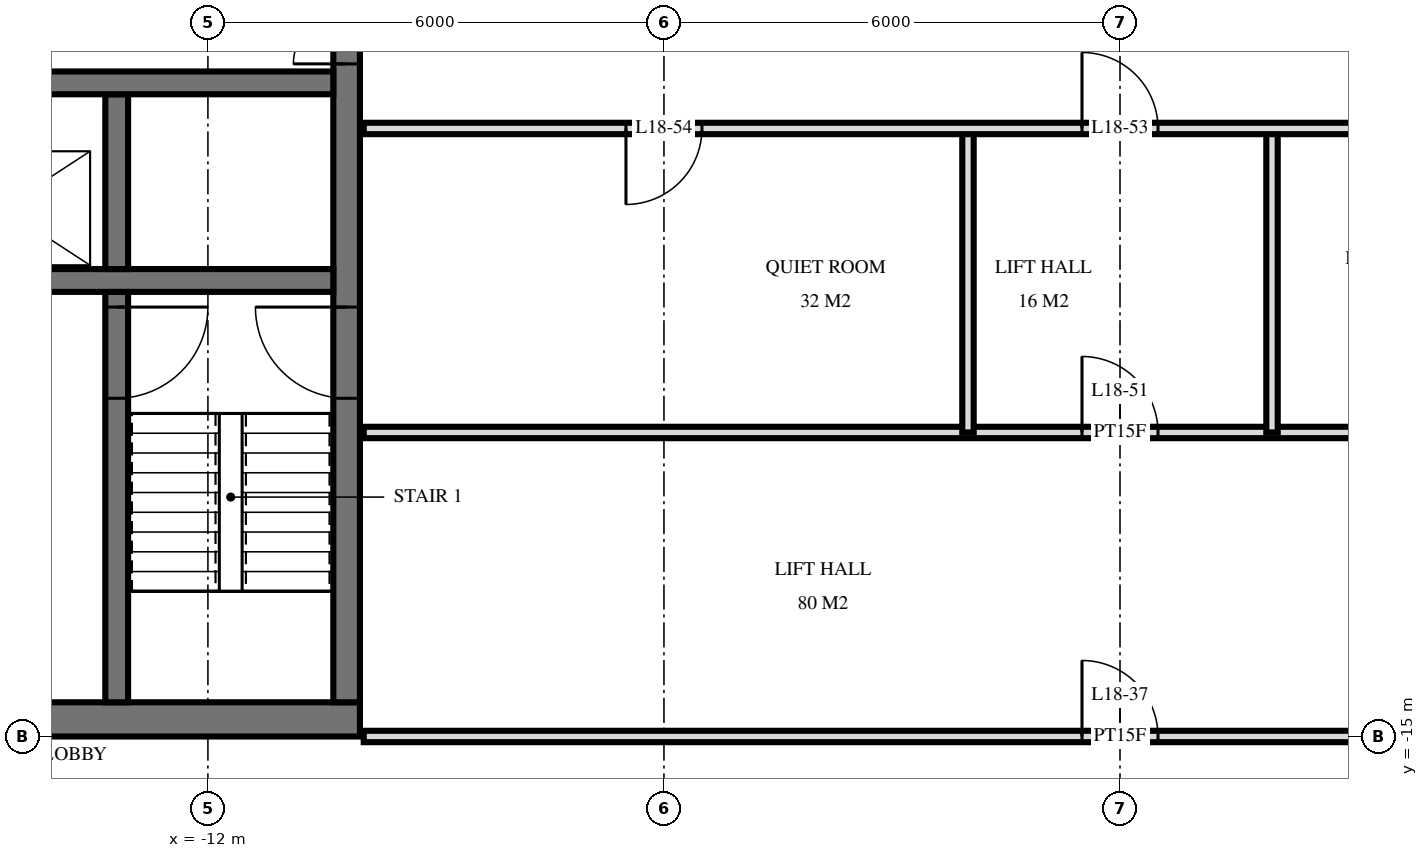
"""IFC4 building model, lengths in metres.
Left out: names, types, materials, properties, quantities, classifications, styles, units other than length and angle.
Written with IfcOpenShell. Run it as: python <this file> out.ifc"""

import sys

from ifc_helpers import new_model, si_unit, direction, frame, frame_2d, origin, place, context, subcontext, project, spatial, rectangle, extrude, element, fill, save


model = new_model("IFC4")
c1 = context("Model", 3, precision=1e-05, world=origin(), true_north=direction((0.0, 1.0)))
c2 = subcontext(c1, "Body", "Model", "MODEL_VIEW")
j1 = project(units=[si_unit("LENGTHUNIT", "METRE"), si_unit("PLANEANGLEUNIT", "RADIAN")], contexts=[c1])
p1 = place(None, origin())
s1 = spatial("IfcSite", under=j1, at=p1, CompositionType="ELEMENT")
p2 = place(p1, origin())
s2 = spatial("IfcBuilding", under=s1, at=p2, CompositionType="ELEMENT")
p3 = place(p2, frame((0.0, 0.0, 74.4)))
s3 = spatial("IfcBuildingStorey", under=s2, at=p3, CompositionType="ELEMENT", Elevation=74.4)
p4 = place(p3, frame((-29.5, -14.775, 0.0), z_axis=(0.0, 0.0, 1.0), x_axis=(1.0, 0.0, 0.0)))
e1 = element("IfcWall", 1, at=p4, inside=s3, PredefinedType="SHEAR", context=c2, shape_type="SweptSolid", body=[
    extrude(rectangle(XDim=19.5, YDim=0.45, at=frame_2d((9.75, 0.0))), origin(), (0.0, 0.0, 1.0), 3.6),
])
p5 = place(p4, frame((11.2, 0.0, 0.0)))
e2 = element("IfcOpeningElement", 2, at=p5, cuts=e1, PredefinedType="OPENING", context=c2, shape_type="SweptSolid", body=[
    extrude(rectangle(XDim=1.2, YDim=2.1, at=frame_2d((0.6, 1.05))), frame((0.0, 0.235, 0.0), z_axis=(0.0, -1.0, 0.0), x_axis=(1.0, 0.0, 0.0)), (0.0, 0.0, 1.0), 0.47),
])
p6 = place(p4, frame((14.25, 0.0, 0.0)))
e3 = element("IfcOpeningElement", 3, at=p6, cuts=e1, PredefinedType="OPENING", context=c2, shape_type="SweptSolid", body=[
    extrude(rectangle(XDim=1.1, YDim=2.1, at=frame_2d((0.55, 1.05))), frame((0.0, 0.235, 0.0), z_axis=(0.0, -1.0, 0.0), x_axis=(1.0, 0.0, 0.0)), (0.0, 0.0, 1.0), 0.47),
])
p7 = place(p4, frame((8.5, 0.0, 0.0)))
e4 = element("IfcOpeningElement", 4, at=p7, cuts=e1, PredefinedType="OPENING", context=c2, shape_type="SweptSolid", body=[
    extrude(rectangle(XDim=0.9, YDim=2.1, at=frame_2d((0.45, 1.05))), frame((0.0, 0.235, 0.0), z_axis=(0.0, -1.0, 0.0), x_axis=(1.0, 0.0, 0.0)), (0.0, 0.0, 1.0), 0.47),
])
p8 = place(p4, frame((6.05, 0.0, 0.0)))
e5 = element("IfcOpeningElement", 5, at=p8, cuts=e1, PredefinedType="OPENING", context=c2, shape_type="SweptSolid", body=[
    extrude(rectangle(XDim=1.0, YDim=2.1, at=frame_2d((0.5, 1.05))), frame((0.0, 0.235, 0.0), z_axis=(0.0, -1.0, 0.0), x_axis=(1.0, 0.0, 0.0)), (0.0, 0.0, 1.0), 0.47),
])
p9 = place(p4, frame((2.988, 0.0, 0.0)))
e6 = element("IfcOpeningElement", 6, at=p9, cuts=e1, PredefinedType="OPENING", context=c2, shape_type="SweptSolid", body=[
    extrude(rectangle(XDim=1.0, YDim=2.1, at=frame_2d((0.5, 1.05))), frame((0.0, 0.235, 0.0), z_axis=(0.0, -1.0, 0.0), x_axis=(1.0, 0.0, 0.0)), (0.0, 0.0, 1.0), 0.47),
])
p10 = place(p4, frame((0.663, 0.0, 0.0)))
e7 = element("IfcOpeningElement", 7, at=p10, cuts=e1, PredefinedType="OPENING", context=c2, shape_type="SweptSolid", body=[
    extrude(rectangle(XDim=1.0, YDim=2.1, at=frame_2d((0.5, 1.05))), frame((0.0, 0.235, 0.0), z_axis=(0.0, -1.0, 0.0), x_axis=(1.0, 0.0, 0.0)), (0.0, 0.0, 1.0), 0.47),
])
p11 = place(p3, frame((-10.175, -14.55, 0.0), z_axis=(0.0, 0.0, 1.0), x_axis=(0.0, 1.0, 0.0)))
e8 = element("IfcWall", 8, at=p11, inside=s3, PredefinedType="SHEAR", context=c2, shape_type="SweptSolid", body=[
    extrude(rectangle(XDim=14.1, YDim=0.35, at=frame_2d((7.05, 0.0))), origin(), (0.0, 0.0, 1.0), 3.6),
])
p12 = place(p11, frame((8.4, 0.0, 0.0)))
e9 = element("IfcOpeningElement", 9, at=p12, cuts=e8, PredefinedType="OPENING", context=c2, shape_type="SweptSolid", body=[
    extrude(rectangle(XDim=1.4, YDim=2.4, at=frame_2d((0.7, 1.2))), frame((0.0, 0.185, 0.0), z_axis=(0.0, -1.0, 0.0), x_axis=(1.0, 0.0, 0.0)), (0.0, 0.0, 1.0), 0.37),
])
p13 = place(p11, frame((10.0, 0.0, 0.0)))
e10 = element("IfcOpeningElement", 10, at=p13, cuts=e8, PredefinedType="OPENING", context=c2, shape_type="SweptSolid", body=[
    extrude(rectangle(XDim=1.4, YDim=2.4, at=frame_2d((0.7, 1.2))), frame((0.0, 0.185, 0.0), z_axis=(0.0, -1.0, 0.0), x_axis=(1.0, 0.0, 0.0)), (0.0, 0.0, 1.0), 0.37),
])
p14 = place(p11, frame((4.0, 0.0, 0.0)))
e11 = element("IfcOpeningElement", 11, at=p14, cuts=e8, PredefinedType="OPENING", context=c2, shape_type="SweptSolid", body=[
    extrude(rectangle(XDim=1.2, YDim=2.1, at=frame_2d((0.6, 1.05))), frame((0.0, 0.185, 0.0), z_axis=(0.0, -1.0, 0.0), x_axis=(1.0, 0.0, 0.0)), (0.0, 0.0, 1.0), 0.37),
])
p15 = place(p3, frame((-29.05, -6.4, 0.0), z_axis=(0.0, 0.0, 1.0), x_axis=(1.0, 0.0, 0.0)))
e12 = element("IfcWall", 12, at=p15, inside=s3, PredefinedType="SHEAR", context=c2, shape_type="SweptSolid", body=[
    extrude(rectangle(XDim=18.7, YDim=0.3, at=frame_2d((9.35, 0.0))), origin(), (0.0, 0.0, 1.0), 3.6),
])
p16 = place(p15, frame((2.95, 0.0, 0.0)))
e13 = element("IfcOpeningElement", 13, at=p16, cuts=e12, PredefinedType="OPENING", context=c2, shape_type="SweptSolid", body=[
    extrude(rectangle(XDim=1.1, YDim=2.1, at=frame_2d((0.55, 1.05))), frame((0.0, 0.16, 0.0), z_axis=(0.0, -1.0, 0.0), x_axis=(1.0, 0.0, 0.0)), (0.0, 0.0, 1.0), 0.32),
])
p17 = place(p15, frame((0.55, 0.0, 0.0)))
e14 = element("IfcOpeningElement", 14, at=p17, cuts=e12, PredefinedType="OPENING", context=c2, shape_type="SweptSolid", body=[
    extrude(rectangle(XDim=1.1, YDim=2.1, at=frame_2d((0.55, 1.05))), frame((0.0, 0.16, 0.0), z_axis=(0.0, -1.0, 0.0), x_axis=(1.0, 0.0, 0.0)), (0.0, 0.0, 1.0), 0.32),
])
p18 = place(p15, frame((10.8, 0.0, 0.0)))
e15 = element("IfcOpeningElement", 15, at=p18, cuts=e12, PredefinedType="OPENING", context=c2, shape_type="SweptSolid", body=[
    extrude(rectangle(XDim=1.1, YDim=2.1, at=frame_2d((0.55, 1.05))), frame((0.0, 0.16, 0.0), z_axis=(0.0, -1.0, 0.0), x_axis=(1.0, 0.0, 0.0)), (0.0, 0.0, 1.0), 0.32),
])
p19 = place(p15, frame((5.6, 0.0, 0.0)))
e16 = element("IfcOpeningElement", 16, at=p19, cuts=e12, PredefinedType="OPENING", context=c2, shape_type="SweptSolid", body=[
    extrude(rectangle(XDim=1.0, YDim=2.1, at=frame_2d((0.5, 1.05))), frame((0.0, 0.16, 0.0), z_axis=(0.0, -1.0, 0.0), x_axis=(1.0, 0.0, 0.0)), (0.0, 0.0, 1.0), 0.32),
])
p20 = place(p3, frame((-29.05, -9.0, 0.0), z_axis=(0.0, 0.0, 1.0), x_axis=(1.0, 0.0, 0.0)))
e17 = element("IfcWall", 17, at=p20, inside=s3, PredefinedType="SHEAR", context=c2, shape_type="SweptSolid", body=[
    extrude(rectangle(XDim=18.7, YDim=0.3, at=frame_2d((9.35, 0.0))), origin(), (0.0, 0.0, 1.0), 3.6),
])
p21 = place(p20, frame((13.8, 0.0, 0.0)))
e18 = element("IfcOpeningElement", 18, at=p21, cuts=e17, PredefinedType="OPENING", context=c2, shape_type="SweptSolid", body=[
    extrude(rectangle(XDim=1.1, YDim=2.1, at=frame_2d((0.55, 1.05))), frame((0.0, 0.16, 0.0), z_axis=(0.0, -1.0, 0.0), x_axis=(1.0, 0.0, 0.0)), (0.0, 0.0, 1.0), 0.32),
])
p22 = place(p3, frame((-13.2, -8.85, 0.0), z_axis=(0.0, 0.0, 1.0), x_axis=(0.0, 1.0, 0.0)))
e19 = element("IfcWall", 19, at=p22, inside=s3, PredefinedType="SHEAR", context=c2, shape_type="SweptSolid", body=[
    extrude(rectangle(XDim=2.3, YDim=0.3, at=frame_2d((1.15, 0.0))), origin(), (0.0, 0.0, 1.0), 3.6),
])
p23 = place(p3, frame((-13.2, -14.55, 0.0), z_axis=(0.0, 0.0, 1.0), x_axis=(0.0, 1.0, 0.0)))
e20 = element("IfcWall", 20, at=p23, inside=s3, PredefinedType="SHEAR", context=c2, shape_type="SweptSolid", body=[
    extrude(rectangle(XDim=5.4, YDim=0.3, at=frame_2d((2.7, 0.0))), origin(), (0.0, 0.0, 1.0), 3.6),
])
p24 = place(p23, frame((4.0, 0.0, 0.0)))
e21 = element("IfcOpeningElement", 21, at=p24, cuts=e20, PredefinedType="OPENING", context=c2, shape_type="SweptSolid", body=[
    extrude(rectangle(XDim=1.2, YDim=2.1, at=frame_2d((0.6, 1.05))), frame((0.0, 0.16, 0.0), z_axis=(0.0, -1.0, 0.0), x_axis=(1.0, 0.0, 0.0)), (0.0, 0.0, 1.0), 0.32),
])
for number, where, z_axis, x_axis in (
    (22, (2.0, -11.0, 0.0), (0.0, 0.0, 1.0), (0.0, 1.0, 0.0)),
    (23, (-2.0, -11.0, 0.0), (0.0, 0.0, 1.0), (0.0, 1.0, 0.0)),
):
    element("IfcWall", number, at=place(p3, frame(where, z_axis=z_axis, x_axis=x_axis)), inside=s3, PredefinedType="PARTITIONING", context=c2, shape_type="SweptSolid", body=[
        extrude(rectangle(XDim=4.0, YDim=0.15, at=frame_2d((2.0, 0.0))), origin(), (0.0, 0.0, 1.0), 3.32),
    ])
p25 = place(p3, frame((-9.95, -15.0, 0.0), z_axis=(0.0, 0.0, 1.0), x_axis=(1.0, 0.0, 0.0)))
e24 = element("IfcWall", 24, at=p25, inside=s3, PredefinedType="PARTITIONING", context=c2, shape_type="SweptSolid", body=[
    extrude(rectangle(XDim=19.9, YDim=0.15, at=frame_2d((9.95, 0.0))), origin(), (0.0, 0.0, 1.0), 2.684),
])
p26 = place(p25, frame((9.45, 0.0, 0.0)))
e25 = element("IfcOpeningElement", 25, at=p26, cuts=e24, PredefinedType="OPENING", context=c2, shape_type="SweptSolid", body=[
    extrude(rectangle(XDim=1.0, YDim=2.1, at=frame_2d((0.5, 1.05))), frame((0.0, 0.085, 0.0), z_axis=(0.0, -1.0, 0.0), x_axis=(1.0, 0.0, 0.0)), (0.0, 0.0, 1.0), 0.17),
])
p27 = place(p3, frame((-9.95, -11.0, 0.0), z_axis=(0.0, 0.0, 1.0), x_axis=(1.0, 0.0, 0.0)))
e26 = element("IfcWall", 26, at=p27, inside=s3, PredefinedType="PARTITIONING", context=c2, shape_type="SweptSolid", body=[
    extrude(rectangle(XDim=19.9, YDim=0.15, at=frame_2d((9.95, 0.0))), origin(), (0.0, 0.0, 1.0), 3.32),
])
p28 = place(p27, frame((9.45, 0.0, 0.0)))
e27 = element("IfcOpeningElement", 27, at=p28, cuts=e26, PredefinedType="OPENING", context=c2, shape_type="SweptSolid", body=[
    extrude(rectangle(XDim=1.0, YDim=2.1, at=frame_2d((0.5, 1.05))), frame((0.0, 0.085, 0.0), z_axis=(0.0, -1.0, 0.0), x_axis=(1.0, 0.0, 0.0)), (0.0, 0.0, 1.0), 0.17),
])
p29 = place(p27, frame((15.45, 0.0, 0.0)))
e28 = element("IfcOpeningElement", 28, at=p29, cuts=e26, PredefinedType="OPENING", context=c2, shape_type="SweptSolid", body=[
    extrude(rectangle(XDim=1.0, YDim=2.1, at=frame_2d((0.5, 1.05))), frame((0.0, 0.085, 0.0), z_axis=(0.0, -1.0, 0.0), x_axis=(1.0, 0.0, 0.0)), (0.0, 0.0, 1.0), 0.17),
])
p30 = place(p3, frame((-9.95, -7.0, 0.0), z_axis=(0.0, 0.0, 1.0), x_axis=(1.0, 0.0, 0.0)))
e29 = element("IfcWall", 29, at=p30, inside=s3, PredefinedType="PARTITIONING", context=c2, shape_type="SweptSolid", body=[
    extrude(rectangle(XDim=19.9, YDim=0.15, at=frame_2d((9.95, 0.0))), origin(), (0.0, 0.0, 1.0), 3.32),
])
p31 = place(p30, frame((9.45, 0.0, 0.0)))
e30 = element("IfcOpeningElement", 30, at=p31, cuts=e29, PredefinedType="OPENING", context=c2, shape_type="SweptSolid", body=[
    extrude(rectangle(XDim=1.0, YDim=2.1, at=frame_2d((0.5, 1.05))), frame((0.0, 0.085, 0.0), z_axis=(0.0, -1.0, 0.0), x_axis=(1.0, 0.0, 0.0)), (0.0, 0.0, 1.0), 0.17),
])
p32 = place(p30, frame((3.45, 0.0, 0.0)))
e31 = element("IfcOpeningElement", 31, at=p32, cuts=e29, PredefinedType="OPENING", context=c2, shape_type="SweptSolid", body=[
    extrude(rectangle(XDim=1.0, YDim=2.1, at=frame_2d((0.5, 1.05))), frame((0.0, 0.085, 0.0), z_axis=(0.0, -1.0, 0.0), x_axis=(1.0, 0.0, 0.0)), (0.0, 0.0, 1.0), 0.17),
])
p33 = place(p12, origin())
e32 = element("IfcDoor", 32, at=p33, inside=s3, OperationType="DOUBLE_DOOR_SINGLE_SWING", PredefinedType="DOOR", context=c2, shape_type="SweptSolid", body=[
    extrude(rectangle(XDim=1.4, YDim=2.4, at=frame_2d((0.7, 1.2))), frame((0.0, 0.025, 0.0), z_axis=(0.0, -1.0, 0.0), x_axis=(1.0, 0.0, 0.0)), (0.0, 0.0, 1.0), 0.05),
])
fill(e9, e32)
p34 = place(p14, origin())
e33 = element("IfcDoor", 33, at=p34, inside=s3, OperationType="SINGLE_SWING_LEFT", PredefinedType="DOOR", context=c2, shape_type="SweptSolid", body=[
    extrude(rectangle(XDim=1.2, YDim=2.1, at=frame_2d((0.6, 1.05))), frame((0.0, 0.025, 0.0), z_axis=(0.0, -1.0, 0.0), x_axis=(1.0, 0.0, 0.0)), (0.0, 0.0, 1.0), 0.05),
])
fill(e11, e33)
p35 = place(p24, frame((0.6, 0.0, 0.0), z_axis=(0.0, 0.0, 1.0), x_axis=(-1.0, 0.0, 0.0)))
e34 = element("IfcDoor", 34, at=p35, inside=s3, OperationType="SINGLE_SWING_RIGHT", PredefinedType="DOOR", context=c2, shape_type="SweptSolid", body=[
    extrude(rectangle(XDim=1.2, YDim=2.1, at=frame_2d((0.0, 1.05))), frame((0.0, -0.025, 0.0), z_axis=(0.0, 1.0, 0.0), x_axis=(-1.0, 0.0, 0.0)), (0.0, 0.0, 1.0), 0.05),
])
fill(e21, e34)
p36 = place(p26, origin())
e35 = element("IfcDoor", 35, at=p36, inside=s3, OperationType="SINGLE_SWING_RIGHT", PredefinedType="DOOR", context=c2, shape_type="SweptSolid", body=[
    extrude(rectangle(XDim=1.0, YDim=2.1, at=frame_2d((0.5, 1.05))), frame((0.0, 0.025, 0.0), z_axis=(0.0, -1.0, 0.0), x_axis=(1.0, 0.0, 0.0)), (0.0, 0.0, 1.0), 0.05),
])
fill(e25, e35)
p37 = place(p28, origin())
e36 = element("IfcDoor", 36, at=p37, inside=s3, OperationType="SINGLE_SWING_RIGHT", PredefinedType="DOOR", context=c2, shape_type="SweptSolid", body=[
    extrude(rectangle(XDim=1.0, YDim=2.1, at=frame_2d((0.5, 1.05))), frame((0.0, 0.025, 0.0), z_axis=(0.0, -1.0, 0.0), x_axis=(1.0, 0.0, 0.0)), (0.0, 0.0, 1.0), 0.05),
])
fill(e27, e36)
p38 = place(p31, origin())
e37 = element("IfcDoor", 37, at=p38, inside=s3, OperationType="SINGLE_SWING_RIGHT", PredefinedType="DOOR", context=c2, shape_type="SweptSolid", body=[
    extrude(rectangle(XDim=1.0, YDim=2.1, at=frame_2d((0.5, 1.05))), frame((0.0, 0.025, 0.0), z_axis=(0.0, -1.0, 0.0), x_axis=(1.0, 0.0, 0.0)), (0.0, 0.0, 1.0), 0.05),
])
fill(e30, e37)
p39 = place(p32, frame((0.5, 0.0, 0.0), z_axis=(0.0, 0.0, 1.0), x_axis=(-1.0, 0.0, 0.0)))
e38 = element("IfcDoor", 38, at=p39, inside=s3, OperationType="SINGLE_SWING_LEFT", PredefinedType="DOOR", context=c2, shape_type="SweptSolid", body=[
    extrude(rectangle(XDim=1.0, YDim=2.1, at=frame_2d((0.0, 1.05))), frame((0.0, -0.025, 0.0), z_axis=(0.0, 1.0, 0.0), x_axis=(-1.0, 0.0, 0.0)), (0.0, 0.0, 1.0), 0.05),
])
fill(e31, e38)
save(model, sys.argv[1])
